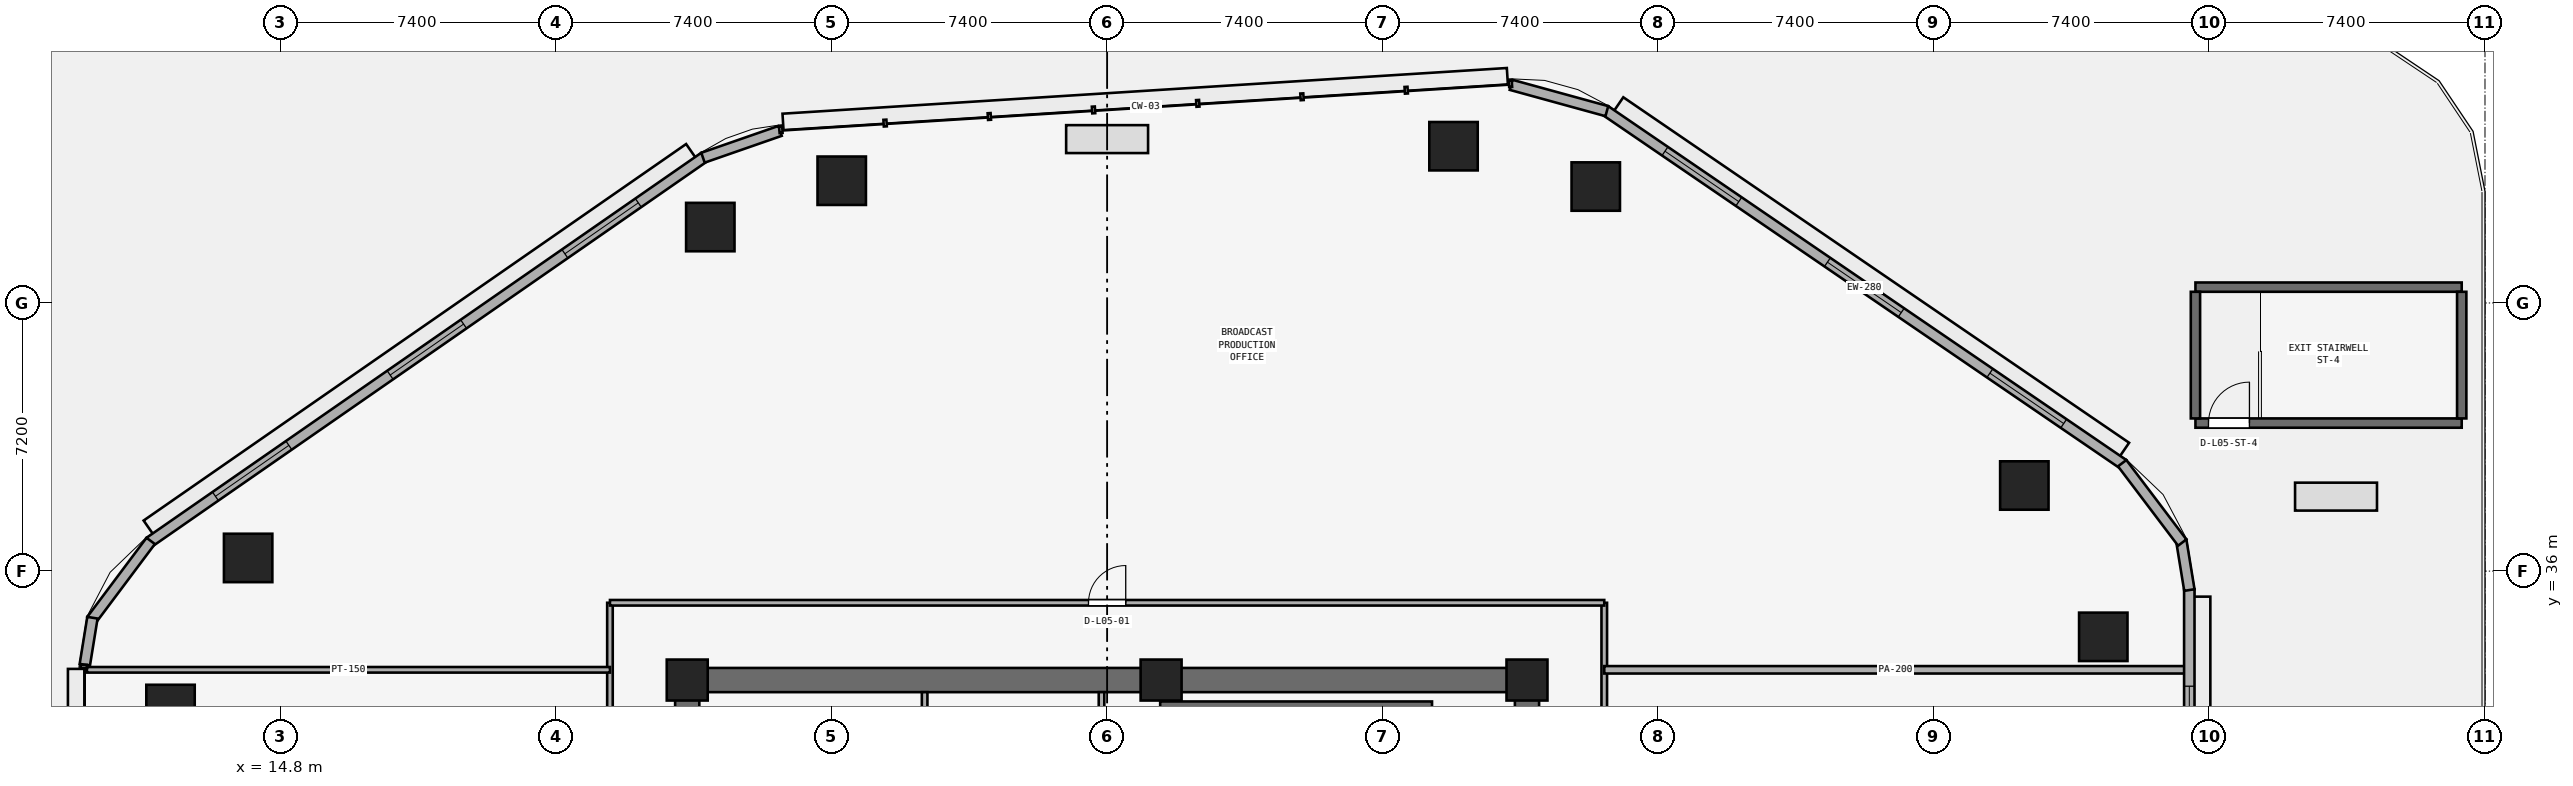
"""IFC4 building model, lengths in metres.
Left out: names, types, materials, properties, quantities, classifications, styles, units other than length and angle.
Written with IfcOpenShell. Run it as: python <this file> out.ifc"""

import sys

from ifc_helpers import new_model, si_unit, direction, frame, frame_2d, origin, origin_2d, place, context, subcontext, project, spatial, rectangle, extrude, element, fill, save


model = new_model("IFC4")
c1 = context("Model", 3, precision=1e-05, world=origin(), true_north=direction((0.0, 1.0)))
c2 = subcontext(c1, "Body", "Model", "MODEL_VIEW")
j1 = project(units=[si_unit("LENGTHUNIT", "METRE"), si_unit("PLANEANGLEUNIT", "RADIAN")], contexts=[c1])
p1 = place(None, origin())
s1 = spatial("IfcSite", under=j1, at=p1, CompositionType="ELEMENT")
p2 = place(p1, origin())
s2 = spatial("IfcBuilding", under=s1, at=p2, CompositionType="ELEMENT")
p3 = place(p2, frame((0.0, 0.0, 25.0)))
s3 = spatial("IfcBuildingStorey", under=s2, at=p3, CompositionType="ELEMENT", Elevation=25.0)
p4 = place(p3, frame((25.4, 33.075, 0.0), z_axis=(0.0, 0.0, 1.0), x_axis=(1.0, 0.0, 0.0)))
e1 = element("IfcWall", 1, at=p4, inside=s3, PredefinedType="SHEAR", context=c2, shape_type="SweptSolid", body=[
    extrude(rectangle(XDim=23.2, YDim=0.65, at=frame_2d((11.6, 0.0))), origin(), (0.0, 0.0, 1.0), 3.525),
])
p5 = place(p3, frame((25.725, 17.65, 0.0), z_axis=(0.0, 0.0, 1.0), x_axis=(0.0, 1.0, 0.0)))
e2 = element("IfcWall", 2, at=p5, inside=s3, PredefinedType="SHEAR", context=c2, shape_type="SweptSolid", body=[
    extrude(rectangle(XDim=15.1, YDim=0.65, at=frame_2d((7.55, 0.0))), origin(), (0.0, 0.0, 1.0), 3.525),
])
p6 = place(p5, frame((6.8, 0.0, 0.0)))
e3 = element("IfcOpeningElement", 3, at=p6, cuts=e2, PredefinedType="OPENING", context=c2, shape_type="SweptSolid", body=[
    extrude(rectangle(XDim=1.5, YDim=2.15, at=frame_2d((0.75, 1.075))), frame((0.0, 0.335, 0.0), z_axis=(0.0, -1.0, 0.0), x_axis=(1.0, 0.0, 0.0)), (0.0, 0.0, 1.0), 0.67),
])
p7 = place(p3, frame((48.275, 17.65, 0.0), z_axis=(0.0, 0.0, 1.0), x_axis=(0.0, 1.0, 0.0)))
e4 = element("IfcWall", 4, at=p7, inside=s3, PredefinedType="SHEAR", context=c2, shape_type="SweptSolid", body=[
    extrude(rectangle(XDim=15.1, YDim=0.65, at=frame_2d((7.55, 0.0))), origin(), (0.0, 0.0, 1.0), 3.525),
])
p8 = place(p7, frame((5.65, 0.0, 0.0)))
e5 = element("IfcOpeningElement", 5, at=p8, cuts=e4, PredefinedType="OPENING", context=c2, shape_type="SweptSolid", body=[
    extrude(rectangle(XDim=1.5, YDim=2.15, at=frame_2d((0.75, 1.075))), frame((0.0, 0.335, 0.0), z_axis=(0.0, -1.0, 0.0), x_axis=(1.0, 0.0, 0.0)), (0.0, 0.0, 1.0), 0.67),
])
for number, where, z_axis, x_axis in (
    (6, (48.275, 33.075, 0.0), (0.0, 0.0, 1.0), (1.0, 0.0, 0.0)),
    (7, (38.45, 33.075, 0.0), (0.0, 0.0, 1.0), (1.0, 0.0, 0.0)),
    (8, (25.725, 33.075, 0.0), (0.0, 0.0, 1.0), (1.0, 0.0, 0.0)),
):
    element("IfcColumn", number, at=place(p3, frame(where, z_axis=z_axis, x_axis=x_axis)), inside=s3, PredefinedType="PILASTER", context=c2, shape_type="SweptSolid", body=[
        extrude(rectangle(XDim=1.1, YDim=1.1, at=origin_2d()), origin(), (0.0, 0.0, 1.0), 3.8),
    ])
for number, where, z_axis, x_axis in (
    (9, (63.75, 34.235, 0.0), (0.0, 0.0, 1.0), (1.0, 0.0, 0.0)),
    (10, (61.63, 38.299, 0.0), (0.0, 0.0, 1.0), (1.0, 0.0, 0.0)),
    (11, (50.122, 46.326, 0.0), (0.0, 0.0, 1.0), (1.0, 0.0, 0.0)),
    (12, (46.302, 47.409, 0.0), (0.0, 0.0, 1.0), (1.0, 0.0, 0.0)),
    (13, (29.874, 46.482, 0.0), (0.0, 0.0, 1.0), (1.0, 0.0, 0.0)),
    (14, (26.344, 45.238, 0.0), (0.0, 0.0, 1.0), (1.0, 0.0, 0.0)),
    (15, (13.934, 36.354, 0.0), (0.0, 0.0, 1.0), (1.0, 0.0, 0.0)),
    (16, (11.85, 32.298, 0.0), (0.0, 0.0, 1.0), (1.0, 0.0, 0.0)),
):
    element("IfcColumn", number, at=place(p3, frame(where, z_axis=z_axis, x_axis=x_axis)), inside=s3, PredefinedType="COLUMN", context=c2, shape_type="SweptSolid", body=[
        extrude(rectangle(XDim=1.3, YDim=1.3, at=origin_2d()), origin(), (0.0, 0.0, 1.0), 3.8),
    ])
p9 = place(p3, frame((38.425, 32.375, 0.0), z_axis=(0.0, 0.0, 1.0), x_axis=(1.0, 0.0, 0.0)))
e17 = element("IfcWall", 17, at=p9, inside=s3, PredefinedType="SHEAR", context=c2, shape_type="SweptSolid", body=[
    extrude(rectangle(XDim=7.3, YDim=0.25, at=frame_2d((3.65, 0.0))), origin(), (0.0, 0.0, 1.0), 3.525),
])
p10 = place(p3, frame((66.225, 39.975, 0.0), z_axis=(0.0, 0.0, 1.0), x_axis=(1.0, 0.0, 0.0)))
e18 = element("IfcWall", 18, at=p10, inside=s3, PredefinedType="SHEAR", context=c2, shape_type="SweptSolid", body=[
    extrude(rectangle(XDim=7.15, YDim=0.25, at=frame_2d((3.575, 0.0))), origin(), (0.0, 0.0, 1.0), 3.525),
])
p11 = place(p10, frame((0.35, 0.0, 0.0)))
e19 = element("IfcOpeningElement", 19, at=p11, cuts=e18, PredefinedType="OPENING", context=c2, shape_type="SweptSolid", body=[
    extrude(rectangle(XDim=1.1, YDim=2.15, at=frame_2d((0.55, 1.075))), frame((0.0, 0.135, 0.0), z_axis=(0.0, -1.0, 0.0), x_axis=(1.0, 0.0, 0.0)), (0.0, 0.0, 1.0), 0.27),
])
p12 = place(p3, frame((66.225, 43.625, 0.0), z_axis=(0.0, 0.0, 1.0), x_axis=(1.0, 0.0, 0.0)))
e20 = element("IfcWall", 20, at=p12, inside=s3, PredefinedType="SHEAR", context=c2, shape_type="SweptSolid", body=[
    extrude(rectangle(XDim=7.15, YDim=0.25, at=frame_2d((3.575, 0.0))), origin(), (0.0, 0.0, 1.0), 3.525),
])
for number, where, z_axis, x_axis in (
    (21, (66.225, 40.1, 0.0), (0.0, 0.0, 1.0), (0.0, 1.0, 0.0)),
    (22, (73.375, 40.1, 0.0), (0.0, 0.0, 1.0), (0.0, 1.0, 0.0)),
):
    element("IfcWall", number, at=place(p3, frame(where, z_axis=z_axis, x_axis=x_axis)), inside=s3, PredefinedType="SHEAR", context=c2, shape_type="SweptSolid", body=[
        extrude(rectangle(XDim=3.4, YDim=0.25, at=frame_2d((1.7, 0.0))), origin(), (0.0, 0.0, 1.0), 3.525),
    ])
for number, where, z_axis, x_axis in (
    (23, (32.1, 30.65, 0.0), (0.0, 0.0, 1.0), (0.0, 1.0, 0.0)),
    (24, (36.85, 30.65, 0.0), (0.0, 0.0, 1.0), (0.0, 1.0, 0.0)),
):
    element("IfcWall", number, at=place(p3, frame(where, z_axis=z_axis, x_axis=x_axis)), inside=s3, PredefinedType="PARTITIONING", context=c2, shape_type="SweptSolid", body=[
        extrude(rectangle(XDim=2.1, YDim=0.15, at=frame_2d((1.05, 0.0))), origin(), (0.0, 0.0, 1.0), 3.525),
    ])
p13 = place(p3, frame((50.35, 15.25, 0.0), z_axis=(0.0, 0.0, 1.0), x_axis=(0.0, 1.0, 0.0)))
e25 = element("IfcWall", 25, at=p13, inside=s3, PredefinedType="PARTITIONING", context=c2, shape_type="SweptSolid", body=[
    extrude(rectangle(XDim=19.9, YDim=0.15, at=frame_2d((9.95, 0.0))), origin(), (0.0, 0.0, 1.0), 3.525),
])
p14 = place(p13, frame((7.825, 0.0, 0.0)))
e26 = element("IfcOpeningElement", 26, at=p14, cuts=e25, PredefinedType="OPENING", context=c2, shape_type="SweptSolid", body=[
    extrude(rectangle(XDim=0.9, YDim=2.1, at=frame_2d((0.45, 1.05))), frame((0.0, 0.085, 0.0), z_axis=(0.0, -1.0, 0.0), x_axis=(1.0, 0.0, 0.0)), (0.0, 0.0, 1.0), 0.17),
])
p15 = place(p13, frame((15.925, 0.0, 0.0)))
e27 = element("IfcOpeningElement", 27, at=p15, cuts=e25, PredefinedType="OPENING", context=c2, shape_type="SweptSolid", body=[
    extrude(rectangle(XDim=1.0, YDim=2.12, at=frame_2d((0.5, 1.06))), frame((0.0, 0.085, 0.0), z_axis=(0.0, -1.0, 0.0), x_axis=(1.0, 0.0, 0.0)), (0.0, 0.0, 1.0), 0.17),
])
p16 = place(p3, frame((23.65, 15.25, 0.0), z_axis=(0.0, 0.0, 1.0), x_axis=(0.0, 1.0, 0.0)))
e28 = element("IfcWall", 28, at=p16, inside=s3, PredefinedType="PARTITIONING", context=c2, shape_type="SweptSolid", body=[
    extrude(rectangle(XDim=19.9, YDim=0.15, at=frame_2d((9.95, 0.0))), origin(), (0.0, 0.0, 1.0), 3.525),
])
p17 = place(p16, frame((9.5, 0.0, 0.0)))
e29 = element("IfcOpeningElement", 29, at=p17, cuts=e28, PredefinedType="OPENING", context=c2, shape_type="SweptSolid", body=[
    extrude(rectangle(XDim=0.9, YDim=2.1, at=frame_2d((0.45, 1.05))), frame((0.0, 0.085, 0.0), z_axis=(0.0, -1.0, 0.0), x_axis=(1.0, 0.0, 0.0)), (0.0, 0.0, 1.0), 0.17),
])
p18 = place(p3, frame((9.605, 33.35, 0.0), z_axis=(0.0, 0.0, 1.0), x_axis=(1.0, 0.0, 0.0)))
e30 = element("IfcWall", 30, at=p18, inside=s3, PredefinedType="PARTITIONING", context=c2, shape_type="SweptSolid", body=[
    extrude(rectangle(XDim=14.045, YDim=0.15, at=frame_2d((7.022, 0.0))), origin(), (0.0, 0.0, 1.0), 3.525),
])
p19 = place(p3, frame((50.35, 33.35, 0.0), z_axis=(0.0, 0.0, 1.0), x_axis=(1.0, 0.0, 0.0)))
e31 = element("IfcWall", 31, at=p19, inside=s3, PredefinedType="PARTITIONING", context=c2, shape_type="SweptSolid", body=[
    extrude(rectangle(XDim=15.645, YDim=0.2, at=frame_2d((7.823, 0.0))), origin(), (0.0, 0.0, 1.0), 2.908),
])
p20 = place(p3, frame((23.65, 35.15, 0.0), z_axis=(0.0, 0.0, 1.0), x_axis=(1.0, 0.0, 0.0)))
e32 = element("IfcWall", 32, at=p20, inside=s3, PredefinedType="PARTITIONING", context=c2, shape_type="SweptSolid", body=[
    extrude(rectangle(XDim=26.7, YDim=0.15, at=frame_2d((13.35, 0.0))), origin(), (0.0, 0.0, 1.0), 3.525),
])
p21 = place(p20, frame((12.85, 0.0, 0.0)))
e33 = element("IfcOpeningElement", 33, at=p21, cuts=e32, PredefinedType="OPENING", context=c2, shape_type="SweptSolid", body=[
    extrude(rectangle(XDim=1.0, YDim=2.12, at=frame_2d((0.5, 1.06))), frame((0.0, 0.085, 0.0), z_axis=(0.0, -1.0, 0.0), x_axis=(1.0, 0.0, 0.0)), (0.0, 0.0, 1.0), 0.17),
])
p22 = place(p3, frame((66.06, 16.183, 0.0), z_axis=(0.0, 0.0, 1.0), x_axis=(0.0, 1.0, 0.0)))
e34 = element("IfcWall", 34, at=p22, inside=s3, PredefinedType="STANDARD", context=c2, shape_type="SweptSolid", body=[
    extrude(rectangle(XDim=19.331, YDim=0.28, at=frame_2d((9.666, 0.0))), origin(), (0.0, 0.0, 1.0), 3.525),
])
p23 = place(p22, frame((9.115, 0.0, 0.0)))
e35 = element("IfcOpeningElement", 35, at=p23, cuts=e34, PredefinedType="OPENING", context=c2, shape_type="SweptSolid", body=[
    extrude(rectangle(XDim=1.1, YDim=2.2, at=frame_2d((0.55, 1.1))), frame((0.0, 0.15, 0.0), z_axis=(0.0, -1.0, 0.0), x_axis=(1.0, 0.0, 0.0)), (0.0, 0.0, 1.0), 0.3),
])
p24 = place(p22, frame((2.355, 0.0, 0.9)))
e36 = element("IfcOpeningElement", 36, at=p24, cuts=e34, PredefinedType="OPENING", context=c2, shape_type="SweptSolid", body=[
    extrude(rectangle(XDim=2.4, YDim=1.75, at=frame_2d((1.2, 0.875))), frame((0.0, 0.15, 0.0), z_axis=(0.0, -1.0, 0.0), x_axis=(1.0, 0.0, 0.0)), (0.0, 0.0, 1.0), 0.3),
])
p25 = place(p22, frame((14.326, 0.0, 0.9)))
e37 = element("IfcOpeningElement", 37, at=p25, cuts=e34, PredefinedType="OPENING", context=c2, shape_type="SweptSolid", body=[
    extrude(rectangle(XDim=2.4, YDim=1.75, at=frame_2d((1.2, 0.875))), frame((0.0, 0.15, 0.0), z_axis=(0.0, -1.0, 0.0), x_axis=(1.0, 0.0, 0.0)), (0.0, 0.0, 1.0), 0.3),
])
p26 = place(p3, frame((64.29, 38.867, 0.0), z_axis=(0.0, 0.0, 1.0), x_axis=(-0.825755550159, 0.564028165416, 0.0)))
e38 = element("IfcWall", 38, at=p26, inside=s3, PredefinedType="STANDARD", context=c2, shape_type="SweptSolid", body=[
    extrude(rectangle(XDim=16.848, YDim=0.28, at=frame_2d((8.424, 0.0))), origin(), (0.0, 0.0, 1.0), 3.525),
])
p27 = place(p26, frame((1.941, 0.0, 0.9)))
e39 = element("IfcOpeningElement", 39, at=p27, cuts=e38, PredefinedType="OPENING", context=c2, shape_type="SweptSolid", body=[
    extrude(rectangle(XDim=2.4, YDim=1.75, at=frame_2d((1.2, 0.875))), frame((0.0, 0.15, 0.0), z_axis=(0.0, -1.0, 0.0), x_axis=(1.0, 0.0, 0.0)), (0.0, 0.0, 1.0), 0.3),
])
p28 = place(p26, frame((7.224, 0.0, 0.9)))
e40 = element("IfcOpeningElement", 40, at=p28, cuts=e38, PredefinedType="OPENING", context=c2, shape_type="SweptSolid", body=[
    extrude(rectangle(XDim=2.4, YDim=1.75, at=frame_2d((1.2, 0.875))), frame((0.0, 0.15, 0.0), z_axis=(0.0, -1.0, 0.0), x_axis=(1.0, 0.0, 0.0)), (0.0, 0.0, 1.0), 0.3),
])
p29 = place(p26, frame((12.507, 0.0, 0.9)))
e41 = element("IfcOpeningElement", 41, at=p29, cuts=e38, PredefinedType="OPENING", context=c2, shape_type="SweptSolid", body=[
    extrude(rectangle(XDim=2.4, YDim=1.75, at=frame_2d((1.2, 0.875))), frame((0.0, 0.15, 0.0), z_axis=(0.0, -1.0, 0.0), x_axis=(1.0, 0.0, 0.0)), (0.0, 0.0, 1.0), 0.3),
])
p30 = place(p3, frame((26.182, 47.118, 0.0), z_axis=(0.0, 0.0, 1.0), x_axis=(-0.821547956627, -0.570139417127, 0.0)))
e42 = element("IfcWall", 42, at=p30, inside=s3, PredefinedType="STANDARD", context=c2, shape_type="SweptSolid", body=[
    extrude(rectangle(XDim=18.132, YDim=0.28, at=frame_2d((9.066, 0.0))), origin(), (0.0, 0.0, 1.0), 3.525),
])
p31 = place(p30, frame((2.156, 0.0, 0.9)))
e43 = element("IfcOpeningElement", 43, at=p31, cuts=e42, PredefinedType="OPENING", context=c2, shape_type="SweptSolid", body=[
    extrude(rectangle(XDim=2.4, YDim=1.75, at=frame_2d((1.2, 0.875))), frame((0.0, 0.15, 0.0), z_axis=(0.0, -1.0, 0.0), x_axis=(1.0, 0.0, 0.0)), (0.0, 0.0, 1.0), 0.3),
])
p32 = place(p30, frame((7.866, 0.0, 0.9)))
e44 = element("IfcOpeningElement", 44, at=p32, cuts=e42, PredefinedType="OPENING", context=c2, shape_type="SweptSolid", body=[
    extrude(rectangle(XDim=2.4, YDim=1.75, at=frame_2d((1.2, 0.875))), frame((0.0, 0.15, 0.0), z_axis=(0.0, -1.0, 0.0), x_axis=(1.0, 0.0, 0.0)), (0.0, 0.0, 1.0), 0.3),
])
p33 = place(p30, frame((13.577, 0.0, 0.9)))
e45 = element("IfcOpeningElement", 45, at=p33, cuts=e42, PredefinedType="OPENING", context=c2, shape_type="SweptSolid", body=[
    extrude(rectangle(XDim=2.4, YDim=1.75, at=frame_2d((1.2, 0.875))), frame((0.0, 0.15, 0.0), z_axis=(0.0, -1.0, 0.0), x_axis=(1.0, 0.0, 0.0)), (0.0, 0.0, 1.0), 0.3),
])
p34 = place(p3, frame((66.062, 35.492, 0.0), z_axis=(0.0, 0.0, 1.0), x_axis=(-0.161182073582, 0.986924687682, 0.0)))
e46 = element("IfcWall", 46, at=p34, inside=s3, PredefinedType="STANDARD", context=c2, shape_type="SweptSolid", body=[
    extrude(rectangle(XDim=1.354, YDim=0.28, at=frame_2d((0.677, 0.0))), origin(), (0.0, 0.0, 1.0), 3.525),
])
p35 = place(p3, frame((65.87, 36.767, 0.0), z_axis=(0.0, 0.0, 1.0), x_axis=(-0.603370463754, 0.797461023166, 0.0)))
e47 = element("IfcWall", 47, at=p35, inside=s3, PredefinedType="STANDARD", context=c2, shape_type="SweptSolid", body=[
    extrude(rectangle(XDim=2.673, YDim=0.28, at=frame_2d((1.336, 0.0))), origin(), (0.0, 0.0, 1.0), 3.525),
])
p36 = place(p3, frame((50.419, 48.351, 0.0), z_axis=(0.0, 0.0, 1.0), x_axis=(-0.964263320055, 0.264945748402, 0.0)))
e48 = element("IfcWall", 48, at=p36, inside=s3, PredefinedType="STANDARD", context=c2, shape_type="SweptSolid", body=[
    extrude(rectangle(XDim=2.666, YDim=0.28, at=frame_2d((1.333, 0.0))), origin(), (0.0, 0.0, 1.0), 3.525),
])
p37 = place(p3, frame((28.217, 47.82, 0.0), z_axis=(0.0, 0.0, 1.0), x_axis=(-0.944478751803, -0.328572499447, 0.0)))
e49 = element("IfcWall", 49, at=p37, inside=s3, PredefinedType="STANDARD", context=c2, shape_type="SweptSolid", body=[
    extrude(rectangle(XDim=2.19, YDim=0.28, at=frame_2d((1.095, 0.0))), origin(), (0.0, 0.0, 1.0), 3.525),
])
p38 = place(p3, frame((11.318, 36.811, 0.0), z_axis=(0.0, 0.0, 1.0), x_axis=(-0.599455152629, -0.800408345775, 0.0)))
e50 = element("IfcWall", 50, at=p38, inside=s3, PredefinedType="STANDARD", context=c2, shape_type="SweptSolid", body=[
    extrude(rectangle(XDim=2.653, YDim=0.28, at=frame_2d((1.327, 0.0))), origin(), (0.0, 0.0, 1.0), 3.525),
])
p39 = place(p3, frame((9.753, 34.749, 0.0), z_axis=(0.0, 0.0, 1.0), x_axis=(-0.159940475951, -0.987126660643, 0.0)))
e51 = element("IfcWall", 51, at=p39, inside=s3, PredefinedType="STANDARD", context=c2, shape_type="SweptSolid", body=[
    extrude(rectangle(XDim=1.279, YDim=0.28, at=frame_2d((0.64, 0.0))), origin(), (0.0, 0.0, 1.0), 3.525),
])
p40 = place(p11, origin())
e52 = element("IfcDoor", 52, at=p40, inside=s3, OperationType="SINGLE_SWING_RIGHT", PredefinedType="DOOR", context=c2, shape_type="SweptSolid", body=[
    extrude(rectangle(XDim=1.1, YDim=2.15, at=frame_2d((0.55, 1.075))), frame((0.0, 0.025, 0.0), z_axis=(0.0, -1.0, 0.0), x_axis=(1.0, 0.0, 0.0)), (0.0, 0.0, 1.0), 0.05),
])
fill(e19, e52)
p41 = place(p21, origin())
e53 = element("IfcDoor", 53, at=p41, inside=s3, OperationType="SINGLE_SWING_RIGHT", PredefinedType="DOOR", context=c2, shape_type="SweptSolid", body=[
    extrude(rectangle(XDim=1.0, YDim=2.12, at=frame_2d((0.5, 1.06))), frame((0.0, 0.025, 0.0), z_axis=(0.0, -1.0, 0.0), x_axis=(1.0, 0.0, 0.0)), (0.0, 0.0, 1.0), 0.05),
])
fill(e33, e53)
p42 = place(p25, origin())
e54 = element("IfcWindow", 54, at=p42, inside=s3, PartitioningType="SINGLE_PANEL", PredefinedType="WINDOW", context=c2, shape_type="SweptSolid", body=[
    extrude(rectangle(XDim=2.4, YDim=1.75, at=frame_2d((1.2, 0.875))), frame((0.0, 0.03, 0.0), z_axis=(0.0, -1.0, 0.0), x_axis=(1.0, 0.0, 0.0)), (0.0, 0.0, 1.0), 0.06),
])
fill(e37, e54)
p43 = place(p27, origin())
e55 = element("IfcWindow", 55, at=p43, inside=s3, PartitioningType="SINGLE_PANEL", PredefinedType="WINDOW", context=c2, shape_type="SweptSolid", body=[
    extrude(rectangle(XDim=2.4, YDim=1.75, at=frame_2d((1.2, 0.875))), frame((0.0, 0.03, 0.0), z_axis=(0.0, -1.0, 0.0), x_axis=(1.0, 0.0, 0.0)), (0.0, 0.0, 1.0), 0.06),
])
fill(e39, e55)
p44 = place(p28, origin())
e56 = element("IfcWindow", 56, at=p44, inside=s3, PartitioningType="SINGLE_PANEL", PredefinedType="WINDOW", context=c2, shape_type="SweptSolid", body=[
    extrude(rectangle(XDim=2.4, YDim=1.75, at=frame_2d((1.2, 0.875))), frame((0.0, 0.03, 0.0), z_axis=(0.0, -1.0, 0.0), x_axis=(1.0, 0.0, 0.0)), (0.0, 0.0, 1.0), 0.06),
])
fill(e40, e56)
p45 = place(p29, origin())
e57 = element("IfcWindow", 57, at=p45, inside=s3, PartitioningType="SINGLE_PANEL", PredefinedType="WINDOW", context=c2, shape_type="SweptSolid", body=[
    extrude(rectangle(XDim=2.4, YDim=1.75, at=frame_2d((1.2, 0.875))), frame((0.0, 0.03, 0.0), z_axis=(0.0, -1.0, 0.0), x_axis=(1.0, 0.0, 0.0)), (0.0, 0.0, 1.0), 0.06),
])
fill(e41, e57)
p46 = place(p31, origin())
e58 = element("IfcWindow", 58, at=p46, inside=s3, PartitioningType="SINGLE_PANEL", PredefinedType="WINDOW", context=c2, shape_type="SweptSolid", body=[
    extrude(rectangle(XDim=2.4, YDim=1.75, at=frame_2d((1.2, 0.875))), frame((0.0, 0.03, 0.0), z_axis=(0.0, -1.0, 0.0), x_axis=(1.0, 0.0, 0.0)), (0.0, 0.0, 1.0), 0.06),
])
fill(e43, e58)
p47 = place(p32, origin())
e59 = element("IfcWindow", 59, at=p47, inside=s3, PartitioningType="SINGLE_PANEL", PredefinedType="WINDOW", context=c2, shape_type="SweptSolid", body=[
    extrude(rectangle(XDim=2.4, YDim=1.75, at=frame_2d((1.2, 0.875))), frame((0.0, 0.03, 0.0), z_axis=(0.0, -1.0, 0.0), x_axis=(1.0, 0.0, 0.0)), (0.0, 0.0, 1.0), 0.06),
])
fill(e44, e59)
p48 = place(p33, origin())
e60 = element("IfcWindow", 60, at=p48, inside=s3, PartitioningType="SINGLE_PANEL", PredefinedType="WINDOW", context=c2, shape_type="SweptSolid", body=[
    extrude(rectangle(XDim=2.4, YDim=1.75, at=frame_2d((1.2, 0.875))), frame((0.0, 0.03, 0.0), z_axis=(0.0, -1.0, 0.0), x_axis=(1.0, 0.0, 0.0)), (0.0, 0.0, 1.0), 0.06),
])
fill(e45, e60)
save(model, sys.argv[1])
